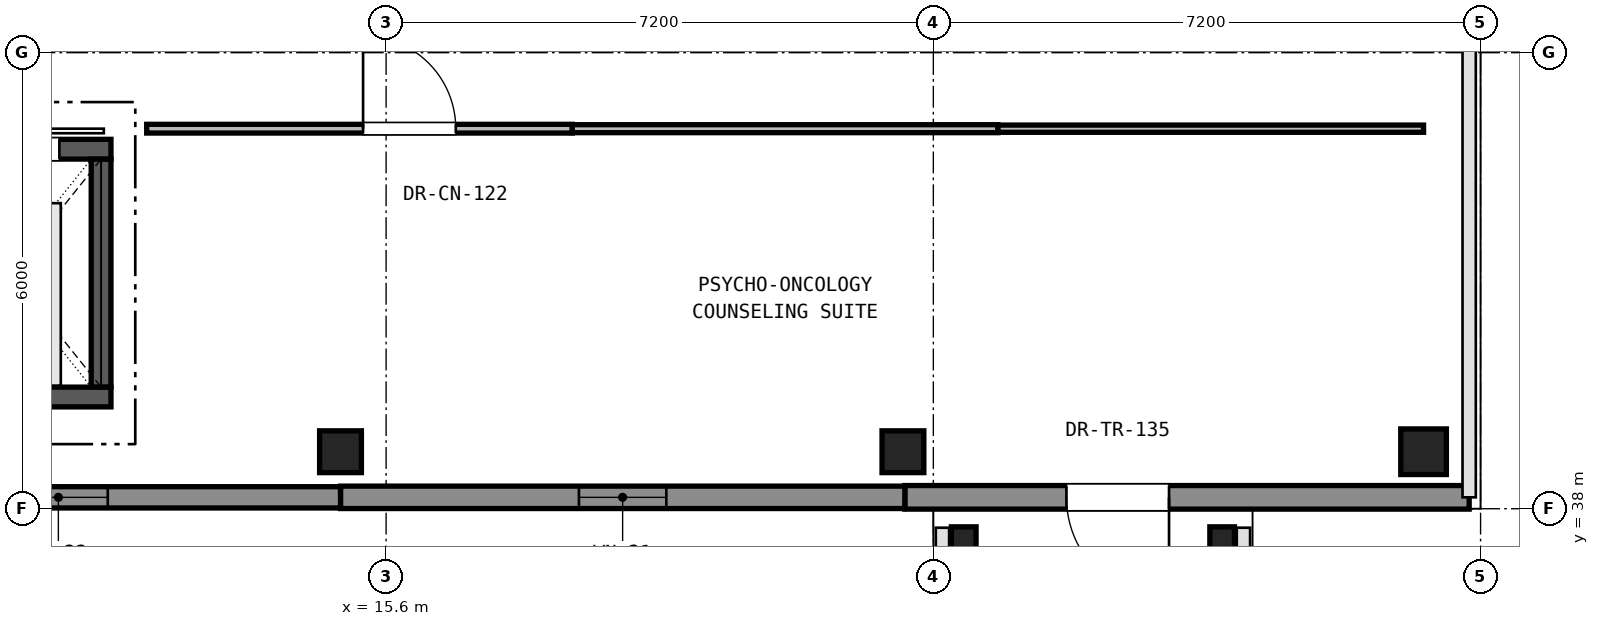
"""IFC4 building model, lengths in metres.
Left out: names, types, materials, properties, quantities, classifications, styles, units other than length and angle.
Written with IfcOpenShell. Run it as: python <this file> out.ifc"""

import sys

from ifc_helpers import new_model, si_unit, direction, frame, frame_2d, origin, origin_2d, place, context, subcontext, project, spatial, rectangle, circle, hollow_circle, extrude, element, fill, save


model = new_model("IFC4")
c1 = context("Model", 3, precision=1e-05, world=origin(), true_north=direction((0.0, 1.0)))
c2 = subcontext(c1, "Body", "Model", "MODEL_VIEW")
j1 = project(units=[si_unit("LENGTHUNIT", "METRE"), si_unit("PLANEANGLEUNIT", "RADIAN")], contexts=[c1])
p1 = place(None, origin())
s1 = spatial("IfcSite", under=j1, at=p1, CompositionType="ELEMENT")
p2 = place(p1, origin())
s2 = spatial("IfcBuilding", under=s1, at=p2, CompositionType="ELEMENT")
p3 = place(p2, frame((0.0, 0.0, 5.1)))
s3 = spatial("IfcBuildingStorey", under=s2, at=p3, CompositionType="ELEMENT", Elevation=5.1)
for number, where, z_axis, x_axis in (
    (1, (15.0, 38.75, 0.0), (0.0, 0.0, 1.0), (1.0, 0.0, 0.0)),
    (2, (22.4, 38.75, 0.0), (0.0, 0.0, 1.0), (1.0, 0.0, 0.0)),
):
    element("IfcColumn", number, at=place(p3, frame(where, z_axis=z_axis, x_axis=x_axis)), inside=s3, PredefinedType="COLUMN", context=c2, shape_type="SweptSolid", body=[
        extrude(rectangle(XDim=0.55, YDim=0.55, at=origin_2d()), origin(), (0.0, 0.0, 1.0), 4.42),
    ])
p4 = place(p3, frame((29.25, 38.75, 0.0), z_axis=(0.0, 0.0, 1.0), x_axis=(1.0, 0.0, 0.0)))
e3 = element("IfcColumn", 3, at=p4, inside=s3, PredefinedType="COLUMN", context=c2, shape_type="SweptSolid", body=[
    extrude(circle(Radius=0.3, at=origin_2d()), origin(), (0.0, 0.0, 1.0), 4.42),
])
for number, where, z_axis, x_axis in (
    (4, (23.2, 37.6, 0.0), (0.0, 0.0, 1.0), (1.0, 0.0, 0.0)),
    (5, (26.6, 37.6, 0.0), (0.0, 0.0, 1.0), (1.0, 0.0, 0.0)),
):
    element("IfcColumn", number, at=place(p3, frame(where, z_axis=z_axis, x_axis=x_axis)), inside=s3, PredefinedType="COLUMN", context=c2, shape_type="SweptSolid", body=[
        extrude(hollow_circle(Radius=0.162, WallThickness=0.012, at=origin_2d()), origin(), (0.0, 0.0, 1.0), 4.42),
    ])
p5 = place(p3, frame((29.85, 38.15, 0.0), z_axis=(0.0, 0.0, 1.0), x_axis=(-1.0, 0.0, 0.0)))
e6 = element("IfcWall", 6, at=p5, inside=s3, PredefinedType="SOLIDWALL", context=c2, shape_type="SweptSolid", body=[
    extrude(rectangle(XDim=7.425, YDim=0.31, at=frame_2d((3.712, 0.0))), origin(), (0.0, 0.0, 1.0), 4.12),
])
p6 = place(p5, frame((3.949, 0.0, 0.0)))
e7 = element("IfcOpeningElement", 7, at=p6, cuts=e6, PredefinedType="OPENING", context=c2, shape_type="SweptSolid", body=[
    extrude(rectangle(XDim=1.35, YDim=2.2, at=frame_2d((0.675, 1.1))), frame((0.0, 0.165, 0.0), z_axis=(0.0, -1.0, 0.0), x_axis=(1.0, 0.0, 0.0)), (0.0, 0.0, 1.0), 0.33),
])
p7 = place(p3, frame((22.425, 38.15, 0.0), z_axis=(0.0, 0.0, 1.0), x_axis=(-1.0, 0.0, 0.0)))
e8 = element("IfcWall", 8, at=p7, inside=s3, PredefinedType="SOLIDWALL", context=c2, shape_type="SweptSolid", body=[
    extrude(rectangle(XDim=7.425, YDim=0.295, at=frame_2d((3.712, 0.0))), origin(), (0.0, 0.0, 1.0), 4.12),
])
p8 = place(p7, frame((3.138, 0.0, 0.9)))
e9 = element("IfcOpeningElement", 9, at=p8, cuts=e8, PredefinedType="OPENING", context=c2, shape_type="SweptSolid", body=[
    extrude(rectangle(XDim=1.15, YDim=2.0, at=frame_2d((0.575, 1.0))), frame((0.0, 0.157, 0.0), z_axis=(0.0, -1.0, 0.0), x_axis=(1.0, 0.0, 0.0)), (0.0, 0.0, 1.0), 0.315),
])
p9 = place(p3, frame((15.0, 38.15, 0.0), z_axis=(0.0, 0.0, 1.0), x_axis=(-1.0, 0.0, 0.0)))
e10 = element("IfcWall", 10, at=p9, inside=s3, PredefinedType="SOLIDWALL", context=c2, shape_type="SweptSolid", body=[
    extrude(rectangle(XDim=7.425, YDim=0.28, at=frame_2d((3.712, 0.0))), origin(), (0.0, 0.0, 1.0), 4.12),
])
p10 = place(p9, frame((3.062, 0.0, 0.9)))
e11 = element("IfcOpeningElement", 11, at=p10, cuts=e10, PredefinedType="OPENING", context=c2, shape_type="SweptSolid", body=[
    extrude(rectangle(XDim=1.3, YDim=2.0, at=frame_2d((0.65, 1.0))), frame((0.0, 0.15, 0.0), z_axis=(0.0, -1.0, 0.0), x_axis=(1.0, 0.0, 0.0)), (0.0, 0.0, 1.0), 0.3),
])
p11 = place(p3, frame((9.322, 39.47, 0.0), z_axis=(0.0, 0.0, 1.0), x_axis=(1.0, 0.0, 0.0)))
e12 = element("IfcWall", 12, at=p11, inside=s3, PredefinedType="SHEAR", context=c2, shape_type="SweptSolid", body=[
    extrude(rectangle(XDim=2.658, YDim=0.26, at=frame_2d((1.329, 0.0))), origin(), (0.0, 0.0, 1.0), 4.12),
])
p12 = place(p3, frame((9.322, 42.73, 0.0), z_axis=(0.0, 0.0, 1.0), x_axis=(1.0, 0.0, 0.0)))
e13 = element("IfcWall", 13, at=p12, inside=s3, PredefinedType="SHEAR", context=c2, shape_type="SweptSolid", body=[
    extrude(rectangle(XDim=2.658, YDim=0.26, at=frame_2d((1.329, 0.0))), origin(), (0.0, 0.0, 1.0), 4.12),
])
p13 = place(p12, frame((0.679, 0.0, 0.0)))
e14 = element("IfcOpeningElement", 14, at=p13, cuts=e13, PredefinedType="OPENING", context=c2, shape_type="SweptSolid", body=[
    extrude(rectangle(XDim=1.3, YDim=2.2, at=frame_2d((0.65, 1.1))), frame((0.0, 0.14, 0.0), z_axis=(0.0, -1.0, 0.0), x_axis=(1.0, 0.0, 0.0)), (0.0, 0.0, 1.0), 0.28),
])
p14 = place(p3, frame((11.85, 39.602, 0.0), z_axis=(0.0, 0.0, 1.0), x_axis=(0.0, 1.0, 0.0)))
e15 = element("IfcWall", 15, at=p14, inside=s3, PredefinedType="SHEAR", context=c2, shape_type="SweptSolid", body=[
    extrude(rectangle(XDim=2.996, YDim=0.26, at=frame_2d((1.498, 0.0))), origin(), (0.0, 0.0, 1.0), 4.12),
])
p15 = place(p3, frame((12.45, 43.0, 0.0), z_axis=(0.0, 0.0, 1.0), x_axis=(1.0, 0.0, 0.0)))
e16 = element("IfcWall", 16, at=p15, inside=s3, PredefinedType="PARTITIONING", context=c2, shape_type="SweptSolid", body=[
    extrude(rectangle(XDim=5.6, YDim=0.115, at=frame_2d((2.8, 0.0))), origin(), (0.0, 0.0, 1.0), 3.57),
])
p16 = place(p15, frame((2.847, 0.0, 0.0)))
e17 = element("IfcOpeningElement", 17, at=p16, cuts=e16, PredefinedType="OPENING", context=c2, shape_type="SweptSolid", body=[
    extrude(rectangle(XDim=1.22, YDim=2.2, at=frame_2d((0.61, 1.1))), frame((0.0, 0.067, 0.0), z_axis=(0.0, -1.0, 0.0), x_axis=(1.0, 0.0, 0.0)), (0.0, 0.0, 1.0), 0.135),
])
p17 = place(p3, frame((18.05, 43.0, 0.0), z_axis=(0.0, 0.0, 1.0), x_axis=(1.0, 0.0, 0.0)))
e18 = element("IfcWall", 18, at=p17, inside=s3, PredefinedType="PARTITIONING", context=c2, shape_type="SweptSolid", body=[
    extrude(rectangle(XDim=5.6, YDim=0.105, at=frame_2d((2.8, 0.0))), origin(), (0.0, 0.0, 1.0), 3.47),
])
p18 = place(p3, frame((23.65, 43.0, 0.0), z_axis=(0.0, 0.0, 1.0), x_axis=(1.0, 0.0, 0.0)))
e19 = element("IfcWall", 19, at=p18, inside=s3, PredefinedType="PARTITIONING", context=c2, shape_type="SweptSolid", body=[
    extrude(rectangle(XDim=5.6, YDim=0.095, at=frame_2d((2.8, 0.0))), origin(), (0.0, 0.0, 1.0), 3.583),
])
p19 = place(p6, origin())
e20 = element("IfcDoor", 20, at=p19, inside=s3, OperationType="SINGLE_SWING_LEFT", PredefinedType="DOOR", context=c2, shape_type="SweptSolid", body=[
    extrude(rectangle(XDim=1.35, YDim=2.2, at=frame_2d((0.675, 1.1))), frame((0.0, 0.025, 0.0), z_axis=(0.0, -1.0, 0.0), x_axis=(1.0, 0.0, 0.0)), (0.0, 0.0, 1.0), 0.05),
])
fill(e7, e20)
p20 = place(p8, origin())
e21 = element("IfcWindow", 21, at=p20, inside=s3, PartitioningType="SINGLE_PANEL", PredefinedType="WINDOW", context=c2, shape_type="SweptSolid", body=[
    extrude(rectangle(XDim=1.15, YDim=2.0, at=frame_2d((0.575, 1.0))), frame((0.0, 0.03, 0.0), z_axis=(0.0, -1.0, 0.0), x_axis=(1.0, 0.0, 0.0)), (0.0, 0.0, 1.0), 0.06),
])
fill(e9, e21)
p21 = place(p10, origin())
e22 = element("IfcWindow", 22, at=p21, inside=s3, PartitioningType="SINGLE_PANEL", PredefinedType="WINDOW", context=c2, shape_type="SweptSolid", body=[
    extrude(rectangle(XDim=1.3, YDim=2.0, at=frame_2d((0.65, 1.0))), frame((0.0, 0.03, 0.0), z_axis=(0.0, -1.0, 0.0), x_axis=(1.0, 0.0, 0.0)), (0.0, 0.0, 1.0), 0.06),
])
fill(e11, e22)
p22 = place(p13, origin())
e23 = element("IfcDoor", 23, at=p22, inside=s3, OperationType="SLIDING_TO_RIGHT", PredefinedType="DOOR", context=c2, shape_type="SweptSolid", body=[
    extrude(rectangle(XDim=1.3, YDim=2.2, at=frame_2d((0.65, 1.1))), frame((0.0, 0.025, 0.0), z_axis=(0.0, -1.0, 0.0), x_axis=(1.0, 0.0, 0.0)), (0.0, 0.0, 1.0), 0.05),
])
fill(e14, e23)
p23 = place(p16, origin())
e24 = element("IfcDoor", 24, at=p23, inside=s3, OperationType="SINGLE_SWING_LEFT", PredefinedType="DOOR", context=c2, shape_type="SweptSolid", body=[
    extrude(rectangle(XDim=1.22, YDim=2.2, at=frame_2d((0.61, 1.1))), frame((0.0, 0.025, 0.0), z_axis=(0.0, -1.0, 0.0), x_axis=(1.0, 0.0, 0.0)), (0.0, 0.0, 1.0), 0.05),
])
fill(e17, e24)
save(model, sys.argv[1])
